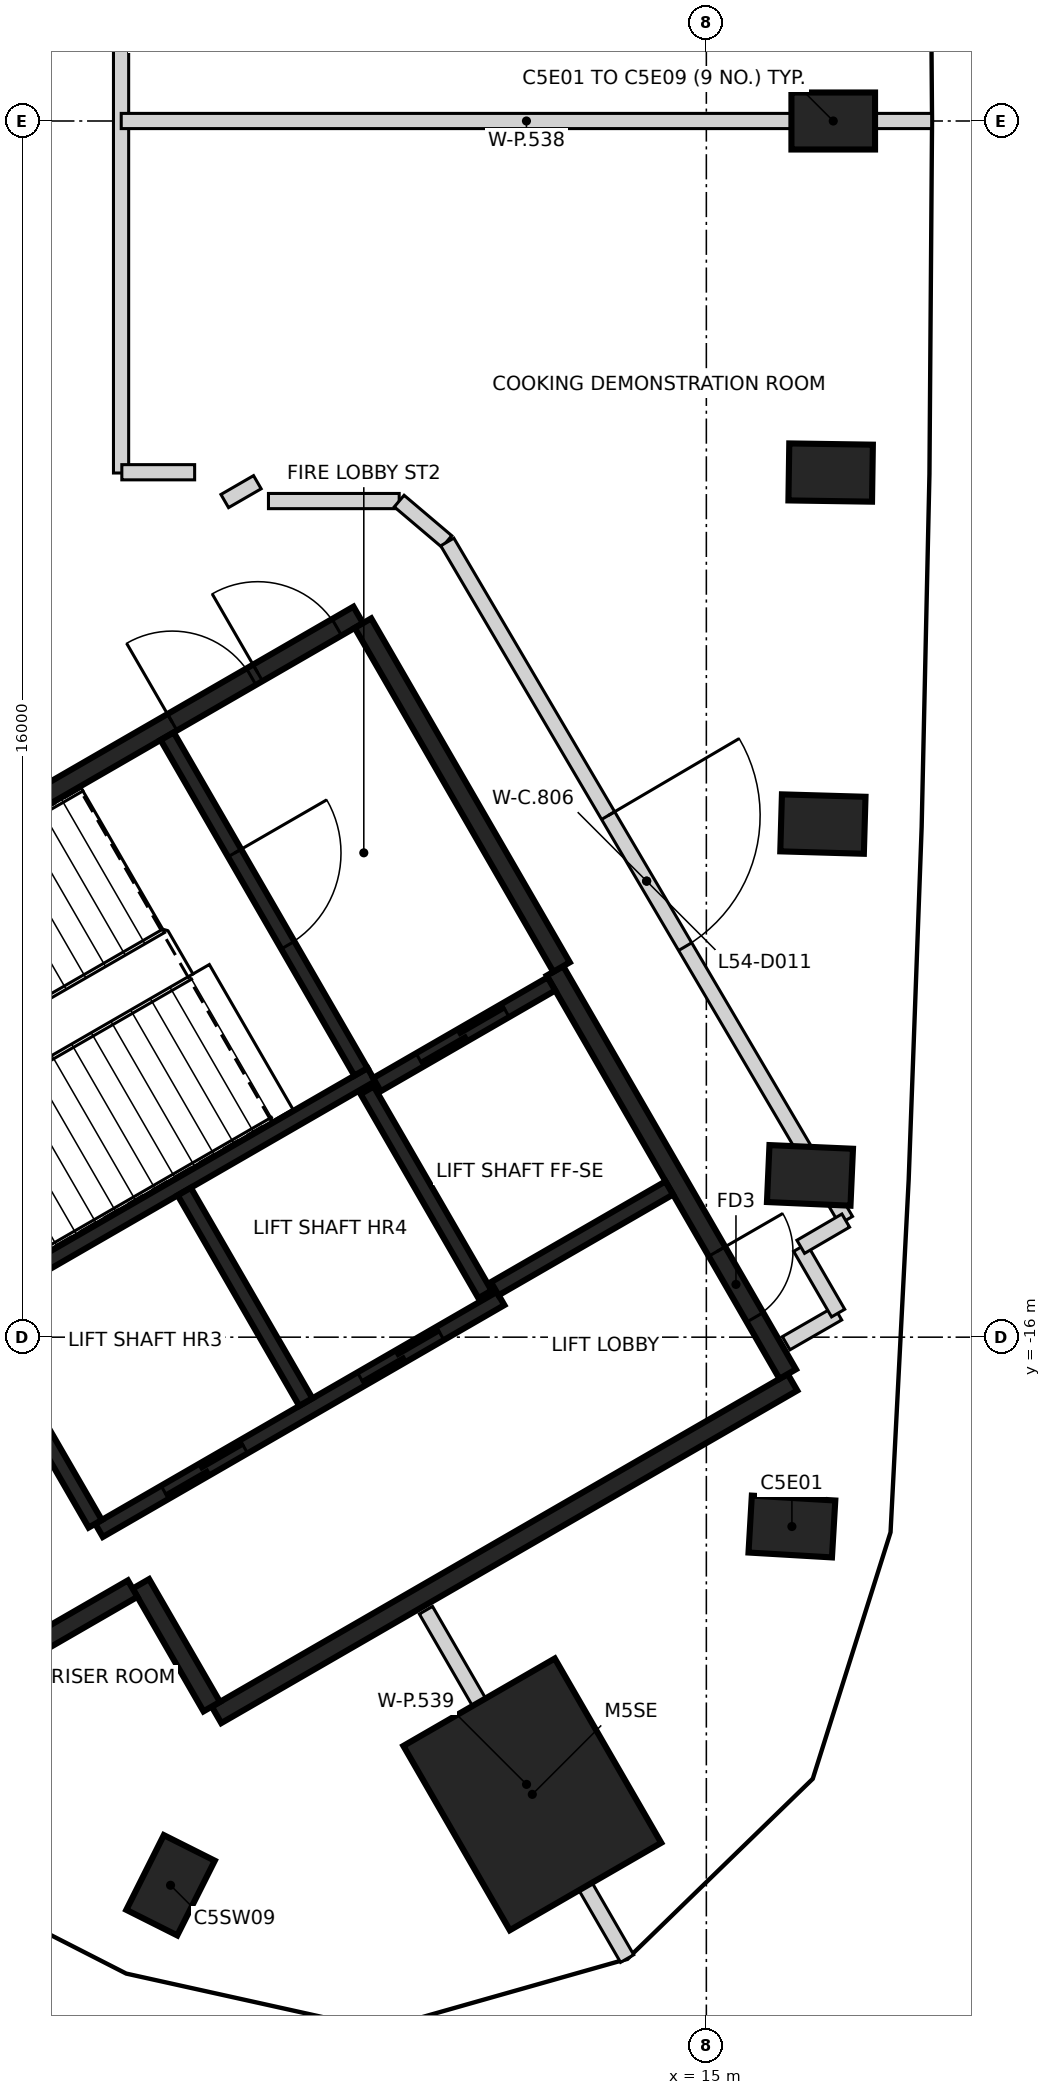
"""IFC4 building model, lengths in metres.
Left out: names, types, materials, properties, quantities, classifications, styles, units other than length and angle.
Written with IfcOpenShell. Run it as: python <this file> out.ifc"""

import sys

from ifc_helpers import new_model, si_unit, direction, frame, frame_2d, origin, origin_2d, place, context, subcontext, project, spatial, rectangle, extrude, element, fill, save


model = new_model("IFC4")
c1 = context("Model", 3, precision=1e-05, world=origin(), true_north=direction((0.0, 1.0)))
c2 = subcontext(c1, "Body", "Model", "MODEL_VIEW")
j1 = project(units=[si_unit("LENGTHUNIT", "METRE"), si_unit("PLANEANGLEUNIT", "RADIAN")], contexts=[c1])
p1 = place(None, origin())
s1 = spatial("IfcSite", under=j1, at=p1, CompositionType="ELEMENT")
p2 = place(p1, origin())
s2 = spatial("IfcBuilding", under=s1, at=p2, CompositionType="ELEMENT")
p3 = place(p2, frame((0.0, 0.0, 216.4)))
s3 = spatial("IfcBuildingStorey", under=s2, at=p3, CompositionType="ELEMENT", Elevation=216.4)
for number, where, z_axis, x_axis in (
    (1, (16.125, -18.491, -0.35), (0.0, 0.0, 1.0), (-0.998, 0.058, 0.0)),
    (2, (16.363, -13.872, -0.35), (0.0, 0.0, 1.0), (-0.999, 0.044, 0.0)),
    (3, (16.533, -9.25, -0.35), (0.0, 0.0, 1.0), (-1.0, 0.029, 0.0)),
    (4, (16.635, -4.625, -0.35), (0.0, 0.0, 1.0), (-1.0, 0.015, 0.0)),
    (5, (16.669, 0.0, -0.35), (0.0, 0.0, 1.0), (1.0, 0.0, 0.0)),
    (6, (7.951, -23.211, -0.35), (0.0, 0.0, 1.0), (0.449, 0.894, 0.0)),
):
    element("IfcColumn", number, at=place(p3, frame(where, z_axis=z_axis, x_axis=x_axis)), inside=s3, PredefinedType="COLUMN", context=c2, shape_type="SweptSolid", body=[
        extrude(rectangle(XDim=1.1, YDim=0.75, at=origin_2d()), origin(), (0.0, 0.0, 1.0), 5.0),
    ])
p4 = place(p3, frame((12.71, -22.015, -0.35), z_axis=(0.0, 0.0, 1.0), x_axis=(-0.5, 0.866025403784, 0.0)))
e7 = element("IfcColumn", 7, at=p4, inside=s3, PredefinedType="COLUMN", context=c2, shape_type="SweptSolid", body=[
    extrude(rectangle(XDim=2.8, YDim=2.3, at=origin_2d()), origin(), (0.0, 0.0, 1.0), 5.0),
])
p5 = place(p3, frame((0.417, -12.273, 0.0), z_axis=(0.0, 0.0, 1.0), x_axis=(0.866021906294, 0.500006057782, 0.0)))
e8 = element("IfcWall", 8, at=p5, inside=s3, PredefinedType="SHEAR", context=c2, shape_type="SweptSolid", body=[
    extrude(rectangle(XDim=11.55, YDim=0.25, at=frame_2d((5.775, 0.0))), origin(), (0.0, 0.0, 1.0), 4.65),
])
p6 = place(p5, frame((10.025, 0.0, 0.0)))
e9 = element("IfcOpeningElement", 9, at=p6, cuts=e8, PredefinedType="OPENING", context=c2, shape_type="SweptSolid", body=[
    extrude(rectangle(XDim=1.2, YDim=2.1, at=frame_2d((0.6, 1.05))), frame((0.0, 0.135, 0.0), z_axis=(0.0, -1.0, 0.0), x_axis=(1.0, 0.0, 0.0)), (0.0, 0.0, 1.0), 0.27),
])
p7 = place(p5, frame((8.725, 0.0, 0.0)))
e10 = element("IfcOpeningElement", 10, at=p7, cuts=e8, PredefinedType="OPENING", context=c2, shape_type="SweptSolid", body=[
    extrude(rectangle(XDim=1.2, YDim=2.1, at=frame_2d((0.6, 1.05))), frame((0.0, 0.135, 0.0), z_axis=(0.0, -1.0, 0.0), x_axis=(1.0, 0.0, 0.0)), (0.0, 0.0, 1.0), 0.27),
])
p8 = place(p3, frame((16.133, -16.594, 0.0), z_axis=(0.0, 0.0, 1.0), x_axis=(-0.866022959057, -0.500004234368, 0.0)))
e11 = element("IfcWall", 11, at=p8, inside=s3, PredefinedType="SHEAR", context=c2, shape_type="SweptSolid", body=[
    extrude(rectangle(XDim=8.75, YDim=0.25, at=frame_2d((4.375, 0.0))), origin(), (0.0, 0.0, 1.0), 4.65),
])
p9 = place(p3, frame((13.008, -11.181, 0.0), z_axis=(0.0, 0.0, 1.0), x_axis=(0.500001955336, -0.866024274868, 0.0)))
e12 = element("IfcWall", 12, at=p9, inside=s3, PredefinedType="SHEAR", context=c2, shape_type="SweptSolid", body=[
    extrude(rectangle(XDim=6.125, YDim=0.25, at=frame_2d((3.062, 0.0))), origin(), (0.0, 0.0, 1.0), 4.65),
])
p10 = place(p9, frame((4.263, 0.0, 0.0)))
e13 = element("IfcOpeningElement", 13, at=p10, cuts=e12, PredefinedType="OPENING", context=c2, shape_type="SweptSolid", body=[
    extrude(rectangle(XDim=1.0, YDim=2.1, at=frame_2d((0.5, 1.05))), frame((0.0, 0.135, 0.0), z_axis=(0.0, -1.0, 0.0), x_axis=(1.0, 0.0, 0.0)), (0.0, 0.0, 1.0), 0.27),
])
p11 = place(p3, frame((10.483, -6.606, 0.0), z_axis=(0.0, 0.0, 1.0), x_axis=(0.49999885962, -0.866026062182, 0.0)))
e14 = element("IfcWall", 14, at=p11, inside=s3, PredefinedType="SHEAR", context=c2, shape_type="SweptSolid", body=[
    extrude(rectangle(XDim=5.225, YDim=0.25, at=frame_2d((2.612, 0.0))), origin(), (0.0, 0.0, 1.0), 4.65),
])
p12 = place(p3, frame((8.493, -20.86, 0.0), z_axis=(0.0, 0.0, 1.0), x_axis=(-0.500039802285, 0.866002422705, 0.0)))
e15 = element("IfcWall", 15, at=p12, inside=s3, PredefinedType="SHEAR", context=c2, shape_type="SweptSolid", body=[
    extrude(rectangle(XDim=1.865, YDim=0.25, at=frame_2d((0.932, 0.0))), origin(), (0.0, 0.0, 1.0), 4.65),
])
p13 = place(p3, frame((7.452, -19.308, 0.0), z_axis=(0.0, 0.0, 1.0), x_axis=(-0.866044474677, -0.49996696679, 0.0)))
e16 = element("IfcWall", 16, at=p13, inside=s3, PredefinedType="SHEAR", context=c2, shape_type="SweptSolid", body=[
    extrude(rectangle(XDim=1.584, YDim=0.25, at=frame_2d((0.792, 0.0))), origin(), (0.0, 0.0, 1.0), 4.65),
])
p14 = place(p3, frame((5.419, -15.534, 0.0), z_axis=(0.0, 0.0, 1.0), x_axis=(0.866029065029, 0.499993658486, 0.0)))
e17 = element("IfcWall", 17, at=p14, inside=s3, PredefinedType="SHEAR", context=c2, shape_type="SweptSolid", body=[
    extrude(rectangle(XDim=5.974, YDim=0.2, at=frame_2d((2.987, 0.0))), origin(), (0.0, 0.0, 1.0), 4.65),
])
p15 = place(p3, frame((7.01, -18.542, 0.0), z_axis=(0.0, 0.0, 1.0), x_axis=(0.866030299012, 0.499991521122, 0.0)))
e18 = element("IfcWall", 18, at=p15, inside=s3, PredefinedType="SHEAR", context=c2, shape_type="SweptSolid", body=[
    extrude(rectangle(XDim=6.1, YDim=0.2, at=frame_2d((3.05, 0.0))), origin(), (0.0, 0.0, 1.0), 4.65),
])
p16 = place(p15, frame((1.0, 0.0, 0.0)))
e19 = element("IfcOpeningElement", 19, at=p16, cuts=e18, PredefinedType="OPENING", context=c2, shape_type="SweptSolid", body=[
    extrude(rectangle(XDim=1.2, YDim=2.1, at=frame_2d((0.6, 1.05))), frame((0.0, 0.11, 0.0), z_axis=(0.0, -1.0, 0.0), x_axis=(1.0, 0.0, 0.0)), (0.0, 0.0, 1.0), 0.22),
])
p17 = place(p15, frame((3.982, 0.0, 0.0)))
e20 = element("IfcOpeningElement", 20, at=p17, cuts=e18, PredefinedType="OPENING", context=c2, shape_type="SweptSolid", body=[
    extrude(rectangle(XDim=1.2, YDim=2.1, at=frame_2d((0.6, 1.05))), frame((0.0, 0.11, 0.0), z_axis=(0.0, -1.0, 0.0), x_axis=(1.0, 0.0, 0.0)), (0.0, 0.0, 1.0), 0.22),
])
p18 = place(p3, frame((7.906, -8.094, 0.0), z_axis=(0.0, 0.0, 1.0), x_axis=(0.500027839223, -0.866009330205, 0.0)))
e21 = element("IfcWall", 21, at=p18, inside=s3, PredefinedType="SHEAR", context=c2, shape_type="SweptSolid", body=[
    extrude(rectangle(XDim=5.098, YDim=0.2, at=frame_2d((2.549, 0.0))), origin(), (0.0, 0.0, 1.0), 4.65),
])
p19 = place(p18, frame((1.774, 0.0, 0.0)))
e22 = element("IfcOpeningElement", 22, at=p19, cuts=e21, PredefinedType="OPENING", context=c2, shape_type="SweptSolid", body=[
    extrude(rectangle(XDim=1.4, YDim=2.1, at=frame_2d((0.7, 1.05))), frame((0.0, 0.11, 0.0), z_axis=(0.0, -1.0, 0.0), x_axis=(1.0, 0.0, 0.0)), (0.0, 0.0, 1.0), 0.22),
])
p20 = place(p3, frame((8.132, -14.084, 0.0), z_axis=(0.0, 0.0, 1.0), x_axis=(0.499997778408, -0.866026686418, 0.0)))
e23 = element("IfcWall", 23, at=p20, inside=s3, PredefinedType="SHEAR", context=c2, shape_type="SweptSolid", body=[
    extrude(rectangle(XDim=3.198, YDim=0.2, at=frame_2d((1.599, 0.0))), origin(), (0.0, 0.0, 1.0), 4.65),
])
p21 = place(p3, frame((6.96, -18.455, 0.0), z_axis=(0.0, 0.0, 1.0), x_axis=(-0.499926705758, 0.866067716099, 0.0)))
e24 = element("IfcWall", 24, at=p21, inside=s3, PredefinedType="SHEAR", context=c2, shape_type="SweptSolid", body=[
    extrude(rectangle(XDim=2.759, YDim=0.2, at=frame_2d((1.38, 0.0))), origin(), (0.0, 0.0, 1.0), 4.65),
])
p22 = place(p3, frame((12.088, -15.437, 0.0), z_axis=(0.0, 0.0, 1.0), x_axis=(-0.500026960575, 0.86600983753, 0.0)))
e25 = element("IfcWall", 25, at=p22, inside=s3, PredefinedType="SHEAR", context=c2, shape_type="SweptSolid", body=[
    extrude(rectangle(XDim=3.1, YDim=0.2, at=frame_2d((1.55, 0.0))), origin(), (0.0, 0.0, 1.0), 4.65),
])
p23 = place(p3, frame((10.666, -12.678, 0.0), z_axis=(0.0, 0.0, 1.0), x_axis=(0.866018407898, 0.500012117035, 0.0)))
e26 = element("IfcWall", 26, at=p23, inside=s3, PredefinedType="SHEAR", context=c2, shape_type="SweptSolid", body=[
    extrude(rectangle(XDim=2.651, YDim=0.2, at=frame_2d((1.325, 0.0))), origin(), (0.0, 0.0, 1.0), 4.65),
])
p24 = place(p23, frame((0.652, 0.0, 0.0)))
e27 = element("IfcOpeningElement", 27, at=p24, cuts=e26, PredefinedType="OPENING", context=c2, shape_type="SweptSolid", body=[
    extrude(rectangle(XDim=1.3, YDim=2.1, at=frame_2d((0.65, 1.05))), frame((0.0, 0.11, 0.0), z_axis=(0.0, -1.0, 0.0), x_axis=(1.0, 0.0, 0.0)), (0.0, 0.0, 1.0), 0.22),
])
p25 = place(p3, frame((14.512, -14.037, 0.0), z_axis=(0.0, 0.0, 1.0), x_axis=(-0.866018407898, -0.500012117035, 0.0)))
e28 = element("IfcWall", 28, at=p25, inside=s3, PredefinedType="SHEAR", context=c2, shape_type="SweptSolid", body=[
    extrude(rectangle(XDim=2.651, YDim=0.2, at=frame_2d((1.325, 0.0))), origin(), (0.0, 0.0, 1.0), 4.65),
])
p26 = place(p3, frame((7.3, -4.631, 0.0), z_axis=(0.0, 0.0, 1.0), x_axis=(0.0, 1.0, 0.0)))
e29 = element("IfcWall", 29, at=p26, inside=s3, PredefinedType="PARTITIONING", context=c2, shape_type="SweptSolid", body=[
    extrude(rectangle(XDim=11.386, YDim=0.2, at=frame_2d((5.693, 0.0))), origin(), (0.0, 0.0, 1.0), 4.65),
])
p27 = place(p26, frame((7.502, 0.0, 0.0)))
e30 = element("IfcOpeningElement", 30, at=p27, cuts=e29, PredefinedType="OPENING", context=c2, shape_type="SweptSolid", body=[
    extrude(rectangle(XDim=1.0, YDim=2.1, at=frame_2d((0.5, 1.05))), frame((0.0, 0.11, 0.0), z_axis=(0.0, -1.0, 0.0), x_axis=(1.0, 0.0, 0.0)), (0.0, 0.0, 1.0), 0.22),
])
p28 = place(p3, frame((7.31, -4.621, 0.0), z_axis=(0.0, 0.0, 1.0), x_axis=(1.0, 0.0, 0.0)))
e31 = element("IfcWall", 31, at=p28, inside=s3, PredefinedType="PARTITIONING", context=c2, shape_type="SweptSolid", body=[
    extrude(rectangle(XDim=0.958, YDim=0.2, at=frame_2d((0.479, 0.0))), origin(), (0.0, 0.0, 1.0), 4.65),
])
p29 = place(p3, frame((8.664, -5.0, 0.0), z_axis=(0.0, 0.0, 1.0), x_axis=(0.865684789836, 0.500589497139, 0.0)))
e32 = element("IfcWall", 32, at=p29, inside=s3, PredefinedType="PARTITIONING", context=c2, shape_type="SweptSolid", body=[
    extrude(rectangle(XDim=0.496, YDim=0.2, at=frame_2d((0.248, 0.0))), origin(), (0.0, 0.0, 1.0), 4.65),
])
p30 = place(p3, frame((9.239, -5.0, 0.0), z_axis=(0.0, 0.0, 1.0), x_axis=(1.0, 0.0, 0.0)))
e33 = element("IfcWall", 33, at=p30, inside=s3, PredefinedType="PARTITIONING", context=c2, shape_type="SweptSolid", body=[
    extrude(rectangle(XDim=1.72, YDim=0.2, at=frame_2d((0.86, 0.0))), origin(), (0.0, 0.0, 1.0), 4.65),
])
p31 = place(p3, frame((10.959, -5.0, 0.0), z_axis=(0.0, 0.0, 1.0), x_axis=(0.762495818899, -0.646993142283, 0.0)))
e34 = element("IfcWall", 34, at=p31, inside=s3, PredefinedType="PARTITIONING", context=c2, shape_type="SweptSolid", body=[
    extrude(rectangle(XDim=0.822, YDim=0.2, at=frame_2d((0.411, 0.0))), origin(), (0.0, 0.0, 1.0), 4.65),
])
p32 = place(p3, frame((11.592, -5.538, 0.0), z_axis=(0.0, 0.0, 1.0), x_axis=(0.506701587767, -0.86212151171, 0.0)))
e35 = element("IfcWall", 35, at=p32, inside=s3, PredefinedType="PARTITIONING", context=c2, shape_type="SweptSolid", body=[
    extrude(rectangle(XDim=10.351, YDim=0.2, at=frame_2d((5.176, 0.0))), origin(), (0.0, 0.0, 1.0), 3.75),
])
p33 = place(p32, frame((4.176, 0.0, 0.0)))
e36 = element("IfcOpeningElement", 36, at=p33, cuts=e35, PredefinedType="OPENING", context=c2, shape_type="SweptSolid", body=[
    extrude(rectangle(XDim=2.0, YDim=2.1, at=frame_2d((1.0, 1.05))), frame((0.0, 0.11, 0.0), z_axis=(0.0, -1.0, 0.0), x_axis=(1.0, 0.0, 0.0)), (0.0, 0.0, 1.0), 0.22),
])
p34 = place(p3, frame((16.05, -16.08, 0.0), z_axis=(0.0, 0.0, 1.0), x_axis=(0.866325177067, 0.499480417614, 0.0)))
e37 = element("IfcWall", 37, at=p34, inside=s3, PredefinedType="PARTITIONING", context=c2, shape_type="SweptSolid", body=[
    extrude(rectangle(XDim=0.786, YDim=0.2, at=frame_2d((0.393, 0.0))), origin(), (0.0, 0.0, 1.0), 3.75),
])
p35 = place(p3, frame((16.235, -14.821, 0.0), z_axis=(0.0, 0.0, 1.0), x_axis=(0.500804343594, -0.86556051749, 0.0)))
e38 = element("IfcWall", 38, at=p35, inside=s3, PredefinedType="PARTITIONING", context=c2, shape_type="SweptSolid", body=[
    extrude(rectangle(XDim=0.996, YDim=0.2, at=frame_2d((0.498, 0.0))), origin(), (0.0, 0.0, 1.0), 3.75),
])
p36 = place(p3, frame((16.242, -14.811, 0.0), z_axis=(0.0, 0.0, 1.0), x_axis=(0.864024330605, 0.503450053255, 0.0)))
e39 = element("IfcWall", 39, at=p36, inside=s3, PredefinedType="PARTITIONING", context=c2, shape_type="SweptSolid", body=[
    extrude(rectangle(XDim=0.685, YDim=0.2, at=frame_2d((0.343, 0.0))), origin(), (0.0, 0.0, 1.0), 3.75),
])
p37 = place(p3, frame((7.302, 0.0, 0.0), z_axis=(0.0, 0.0, 1.0), x_axis=(1.0, 0.0, 0.0)))
e40 = element("IfcWall", 40, at=p37, inside=s3, PredefinedType="PARTITIONING", context=c2, shape_type="SweptSolid", body=[
    extrude(rectangle(XDim=10.662, YDim=0.2, at=frame_2d((5.331, 0.0))), origin(), (0.0, 0.0, 1.0), 4.65),
])
p38 = place(p3, frame((11.311, -19.592, 0.0), z_axis=(0.0, 0.0, 1.0), x_axis=(0.500132351176, -0.865948977311, 0.0)))
e41 = element("IfcWall", 41, at=p38, inside=s3, PredefinedType="PARTITIONING", context=c2, shape_type="SweptSolid", body=[
    extrude(rectangle(XDim=5.293, YDim=0.2, at=frame_2d((2.646, 0.0))), origin(), (0.0, 0.0, 1.0), 4.65),
])
p39 = place(p24, origin())
e42 = element("IfcDoor", 42, at=p39, inside=s3, OperationType="SLIDING_TO_LEFT", PredefinedType="DOOR", context=c2, shape_type="SweptSolid", body=[
    extrude(rectangle(XDim=1.3, YDim=2.1, at=frame_2d((0.65, 1.05))), frame((0.0, 0.025, 0.0), z_axis=(0.0, -1.0, 0.0), x_axis=(1.0, 0.0, 0.0)), (0.0, 0.0, 1.0), 0.05),
])
fill(e27, e42)
p40 = place(p16, origin())
e43 = element("IfcDoor", 43, at=p40, inside=s3, OperationType="DOUBLE_DOOR_SLIDING", PredefinedType="DOOR", context=c2, shape_type="SweptSolid", body=[
    extrude(rectangle(XDim=1.2, YDim=2.1, at=frame_2d((0.6, 1.05))), frame((0.0, 0.025, 0.0), z_axis=(0.0, -1.0, 0.0), x_axis=(1.0, 0.0, 0.0)), (0.0, 0.0, 1.0), 0.05),
])
fill(e19, e43)
p41 = place(p17, origin())
e44 = element("IfcDoor", 44, at=p41, inside=s3, OperationType="DOUBLE_DOOR_SLIDING", PredefinedType="DOOR", context=c2, shape_type="SweptSolid", body=[
    extrude(rectangle(XDim=1.2, YDim=2.1, at=frame_2d((0.6, 1.05))), frame((0.0, 0.025, 0.0), z_axis=(0.0, -1.0, 0.0), x_axis=(1.0, 0.0, 0.0)), (0.0, 0.0, 1.0), 0.05),
])
fill(e20, e44)
p42 = place(p10, origin())
e45 = element("IfcDoor", 45, at=p42, inside=s3, OperationType="SINGLE_SWING_LEFT", PredefinedType="DOOR", context=c2, shape_type="SweptSolid", body=[
    extrude(rectangle(XDim=1.0, YDim=2.1, at=frame_2d((0.5, 1.05))), frame((0.0, 0.025, 0.0), z_axis=(0.0, -1.0, 0.0), x_axis=(1.0, 0.0, 0.0)), (0.0, 0.0, 1.0), 0.05),
])
fill(e13, e45)
p43 = place(p6, origin())
e46 = element("IfcDoor", 46, at=p43, inside=s3, OperationType="SINGLE_SWING_LEFT", PredefinedType="DOOR", context=c2, shape_type="SweptSolid", body=[
    extrude(rectangle(XDim=1.2, YDim=2.1, at=frame_2d((0.6, 1.05))), frame((0.0, 0.025, 0.0), z_axis=(0.0, -1.0, 0.0), x_axis=(1.0, 0.0, 0.0)), (0.0, 0.0, 1.0), 0.05),
])
fill(e9, e46)
p44 = place(p7, origin())
e47 = element("IfcDoor", 47, at=p44, inside=s3, OperationType="SINGLE_SWING_RIGHT", PredefinedType="DOOR", context=c2, shape_type="SweptSolid", body=[
    extrude(rectangle(XDim=1.2, YDim=2.1, at=frame_2d((0.6, 1.05))), frame((0.0, 0.025, 0.0), z_axis=(0.0, -1.0, 0.0), x_axis=(1.0, 0.0, 0.0)), (0.0, 0.0, 1.0), 0.05),
])
fill(e10, e47)
p45 = place(p19, origin())
e48 = element("IfcDoor", 48, at=p45, inside=s3, OperationType="SINGLE_SWING_LEFT", PredefinedType="DOOR", context=c2, shape_type="SweptSolid", body=[
    extrude(rectangle(XDim=1.4, YDim=2.1, at=frame_2d((0.7, 1.05))), frame((0.0, 0.025, 0.0), z_axis=(0.0, -1.0, 0.0), x_axis=(1.0, 0.0, 0.0)), (0.0, 0.0, 1.0), 0.05),
])
fill(e22, e48)
p46 = place(p33, origin())
e49 = element("IfcDoor", 49, at=p46, inside=s3, OperationType="DOUBLE_DOOR_SINGLE_SWING", PredefinedType="DOOR", context=c2, shape_type="SweptSolid", body=[
    extrude(rectangle(XDim=2.0, YDim=2.1, at=frame_2d((1.0, 1.05))), frame((0.0, 0.025, 0.0), z_axis=(0.0, -1.0, 0.0), x_axis=(1.0, 0.0, 0.0)), (0.0, 0.0, 1.0), 0.05),
])
fill(e36, e49)
save(model, sys.argv[1])
